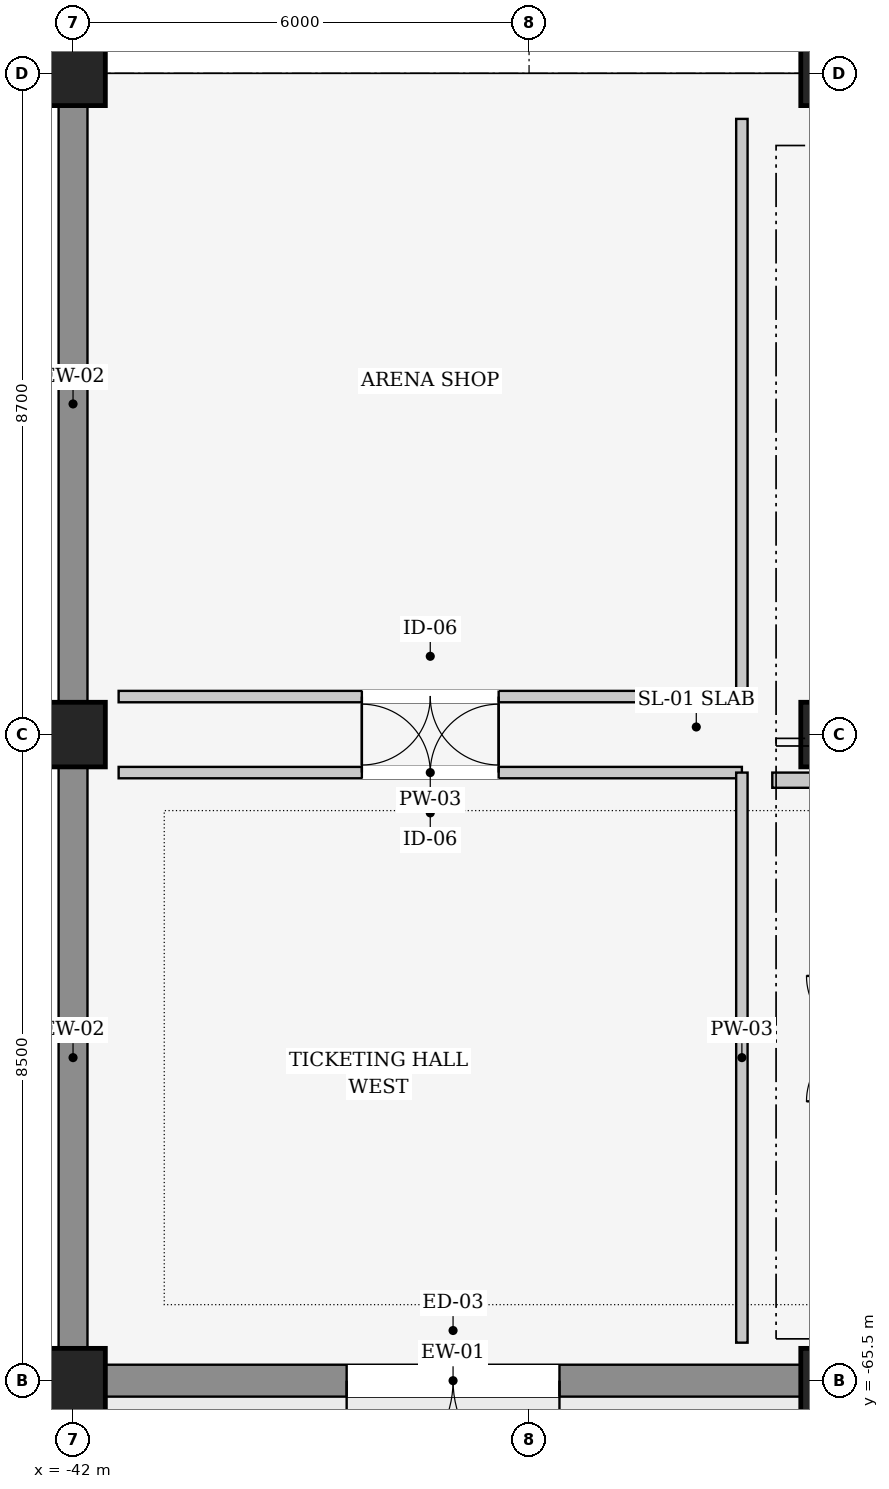
"""IFC4 building model, lengths in metres.
Left out: names, types, materials, properties, quantities, classifications, styles, units other than length and angle.
Written with IfcOpenShell. Run it as: python <this file> out.ifc"""

import sys

from ifc_helpers import new_model, si_unit, direction, frame, frame_2d, origin, origin_2d, place, context, subcontext, project, spatial, rectangle, extrude, element, fill, save


model = new_model("IFC4")
c1 = context("Model", 3, precision=1e-05, world=origin(), true_north=direction((0.0, 1.0)))
c2 = subcontext(c1, "Body", "Model", "MODEL_VIEW")
j1 = project(units=[si_unit("LENGTHUNIT", "METRE"), si_unit("PLANEANGLEUNIT", "RADIAN")], contexts=[c1])
p1 = place(None, origin())
s1 = spatial("IfcSite", under=j1, at=p1, CompositionType="ELEMENT")
p2 = place(p1, origin())
s2 = spatial("IfcBuilding", under=s1, at=p2, CompositionType="ELEMENT")
p3 = place(p2, origin())
s3 = spatial("IfcBuildingStorey", under=s2, at=p3, CompositionType="ELEMENT", Elevation=0.0)
for number, where, z_axis, x_axis in (
    (1, (-42.0, -65.5, 0.0), (0.0, 0.0, 1.0), (1.0, 0.0, 0.0)),
    (2, (-42.0, -57.0, 0.0), (0.0, 0.0, 1.0), (1.0, 0.0, 0.0)),
    (3, (-42.0, -48.3, 0.0), (0.0, 0.0, 1.0), (1.0, 0.0, 0.0)),
    (4, (-32.0, -65.5, 0.0), (0.0, 0.0, 1.0), (1.0, 0.0, 0.0)),
    (5, (-32.0, -57.0, 0.0), (0.0, 0.0, 1.0), (1.0, 0.0, 0.0)),
    (6, (-32.0, -48.3, 0.0), (0.0, 0.0, 1.0), (1.0, 0.0, 0.0)),
):
    element("IfcColumn", number, at=place(p3, frame(where, z_axis=z_axis, x_axis=x_axis)), inside=s3, PredefinedType="COLUMN", context=c2, shape_type="SweptSolid", body=[
        extrude(rectangle(XDim=0.85, YDim=0.85, at=origin_2d()), origin(), (0.0, 0.0, 1.0), 6.0),
    ])
p4 = place(p3, frame((-32.407, -65.5, 0.0), z_axis=(0.0, 0.0, 1.0), x_axis=(-1.0, 0.0, 0.0)))
e7 = element("IfcWall", 7, at=p4, inside=s3, PredefinedType="SOLIDWALL", context=c2, shape_type="SweptSolid", body=[
    extrude(rectangle(XDim=9.186, YDim=0.42, at=frame_2d((4.593, 0.0))), origin(), (0.0, 0.0, 1.0), 4.84),
])
p5 = place(p4, frame((3.193, 0.0, 0.0)))
e8 = element("IfcOpeningElement", 8, at=p5, cuts=e7, PredefinedType="OPENING", context=c2, shape_type="SweptSolid", body=[
    extrude(rectangle(XDim=2.8, YDim=3.2, at=frame_2d((1.4, 1.6))), frame((0.0, 0.22, 0.0), z_axis=(0.0, -1.0, 0.0), x_axis=(1.0, 0.0, 0.0)), (0.0, 0.0, 1.0), 0.44),
])
p6 = place(p3, frame((-42.0, -65.093, 0.0), z_axis=(0.0, 0.0, 1.0), x_axis=(0.0, 1.0, 0.0)))
e9 = element("IfcWall", 9, at=p6, inside=s3, PredefinedType="SOLIDWALL", context=c2, shape_type="SweptSolid", body=[
    extrude(rectangle(XDim=7.686, YDim=0.38, at=frame_2d((3.843, 0.0))), origin(), (0.0, 0.0, 1.0), 4.84),
])
p7 = place(p3, frame((-42.0, -56.593, 0.0), z_axis=(0.0, 0.0, 1.0), x_axis=(0.0, 1.0, 0.0)))
e10 = element("IfcWall", 10, at=p7, inside=s3, PredefinedType="SOLIDWALL", context=c2, shape_type="SweptSolid", body=[
    extrude(rectangle(XDim=7.886, YDim=0.38, at=frame_2d((3.943, 0.0))), origin(), (0.0, 0.0, 1.0), 4.84),
])
p8 = place(p3, frame((-41.4, -57.5, 0.0), z_axis=(0.0, 0.0, 1.0), x_axis=(1.0, 0.0, 0.0)))
e11 = element("IfcWall", 11, at=p8, inside=s3, PredefinedType="PARTITIONING", context=c2, shape_type="SweptSolid", body=[
    extrude(rectangle(XDim=8.2, YDim=0.15, at=frame_2d((4.1, 0.0))), origin(), (0.0, 0.0, 1.0), 4.825),
])
p9 = place(p8, frame((3.2, 0.0, 0.0)))
e12 = element("IfcOpeningElement", 12, at=p9, cuts=e11, PredefinedType="OPENING", context=c2, shape_type="SweptSolid", body=[
    extrude(rectangle(XDim=1.8, YDim=2.2, at=frame_2d((0.9, 1.1))), frame((0.0, 0.085, 0.0), z_axis=(0.0, -1.0, 0.0), x_axis=(1.0, 0.0, 0.0)), (0.0, 0.0, 1.0), 0.17),
])
p10 = place(p3, frame((-33.2, -57.5, 0.0), z_axis=(0.0, 0.0, 1.0), x_axis=(0.0, -1.0, 0.0)))
e13 = element("IfcWall", 13, at=p10, inside=s3, PredefinedType="PARTITIONING", context=c2, shape_type="SweptSolid", body=[
    extrude(rectangle(XDim=7.5, YDim=0.15, at=frame_2d((3.75, 0.0))), origin(), (0.0, 0.0, 1.0), 4.825),
])
p11 = place(p3, frame((-33.2, -56.5, 0.0), z_axis=(0.0, 0.0, 1.0), x_axis=(-1.0, 0.0, 0.0)))
e14 = element("IfcWall", 14, at=p11, inside=s3, PredefinedType="PARTITIONING", context=c2, shape_type="SweptSolid", body=[
    extrude(rectangle(XDim=8.2, YDim=0.15, at=frame_2d((4.1, 0.0))), origin(), (0.0, 0.0, 1.0), 4.825),
])
p12 = place(p11, frame((3.2, 0.0, 0.0)))
e15 = element("IfcOpeningElement", 15, at=p12, cuts=e14, PredefinedType="OPENING", context=c2, shape_type="SweptSolid", body=[
    extrude(rectangle(XDim=1.8, YDim=2.2, at=frame_2d((0.9, 1.1))), frame((0.0, 0.085, 0.0), z_axis=(0.0, -1.0, 0.0), x_axis=(1.0, 0.0, 0.0)), (0.0, 0.0, 1.0), 0.17),
])
p13 = place(p3, frame((-33.2, -48.9, 0.0), z_axis=(0.0, 0.0, 1.0), x_axis=(0.0, -1.0, 0.0)))
e16 = element("IfcWall", 16, at=p13, inside=s3, PredefinedType="PARTITIONING", context=c2, shape_type="SweptSolid", body=[
    extrude(rectangle(XDim=7.6, YDim=0.15, at=frame_2d((3.8, 0.0))), origin(), (0.0, 0.0, 1.0), 4.825),
])
p14 = place(p3, frame((-32.8, -57.6, 0.0), z_axis=(0.0, 0.0, 1.0), x_axis=(1.0, 0.0, 0.0)))
e17 = element("IfcWall", 17, at=p14, inside=s3, PredefinedType="PARTITIONING", context=c2, shape_type="SweptSolid", body=[
    extrude(rectangle(XDim=12.2, YDim=0.2, at=frame_2d((6.1, 0.0))), origin(), (0.0, 0.0, 1.0), 5.025),
])
p15 = place(p14, frame((5.3, 0.0, 0.0)))
e18 = element("IfcOpeningElement", 18, at=p15, cuts=e17, PredefinedType="OPENING", context=c2, shape_type="SweptSolid", body=[
    extrude(rectangle(XDim=1.6, YDim=2.2, at=frame_2d((0.8, 1.1))), frame((0.0, 0.11, 0.0), z_axis=(0.0, -1.0, 0.0), x_axis=(1.0, 0.0, 0.0)), (0.0, 0.0, 1.0), 0.22),
])
p16 = place(p5, origin())
e19 = element("IfcDoor", 19, at=p16, inside=s3, OperationType="DOUBLE_DOOR_SINGLE_SWING", PredefinedType="DOOR", context=c2, shape_type="SweptSolid", body=[
    extrude(rectangle(XDim=2.8, YDim=3.2, at=frame_2d((1.4, 1.6))), frame((0.0, 0.025, 0.0), z_axis=(0.0, -1.0, 0.0), x_axis=(1.0, 0.0, 0.0)), (0.0, 0.0, 1.0), 0.05),
])
fill(e8, e19)
p17 = place(p9, origin())
e20 = element("IfcDoor", 20, at=p17, inside=s3, OperationType="DOUBLE_DOOR_SINGLE_SWING", PredefinedType="DOOR", context=c2, shape_type="SweptSolid", body=[
    extrude(rectangle(XDim=1.8, YDim=2.2, at=frame_2d((0.9, 1.1))), frame((0.0, 0.025, 0.0), z_axis=(0.0, -1.0, 0.0), x_axis=(1.0, 0.0, 0.0)), (0.0, 0.0, 1.0), 0.05),
])
fill(e12, e20)
p18 = place(p12, origin())
e21 = element("IfcDoor", 21, at=p18, inside=s3, OperationType="DOUBLE_DOOR_SINGLE_SWING", PredefinedType="DOOR", context=c2, shape_type="SweptSolid", body=[
    extrude(rectangle(XDim=1.8, YDim=2.2, at=frame_2d((0.9, 1.1))), frame((0.0, 0.025, 0.0), z_axis=(0.0, -1.0, 0.0), x_axis=(1.0, 0.0, 0.0)), (0.0, 0.0, 1.0), 0.05),
])
fill(e15, e21)
save(model, sys.argv[1])
